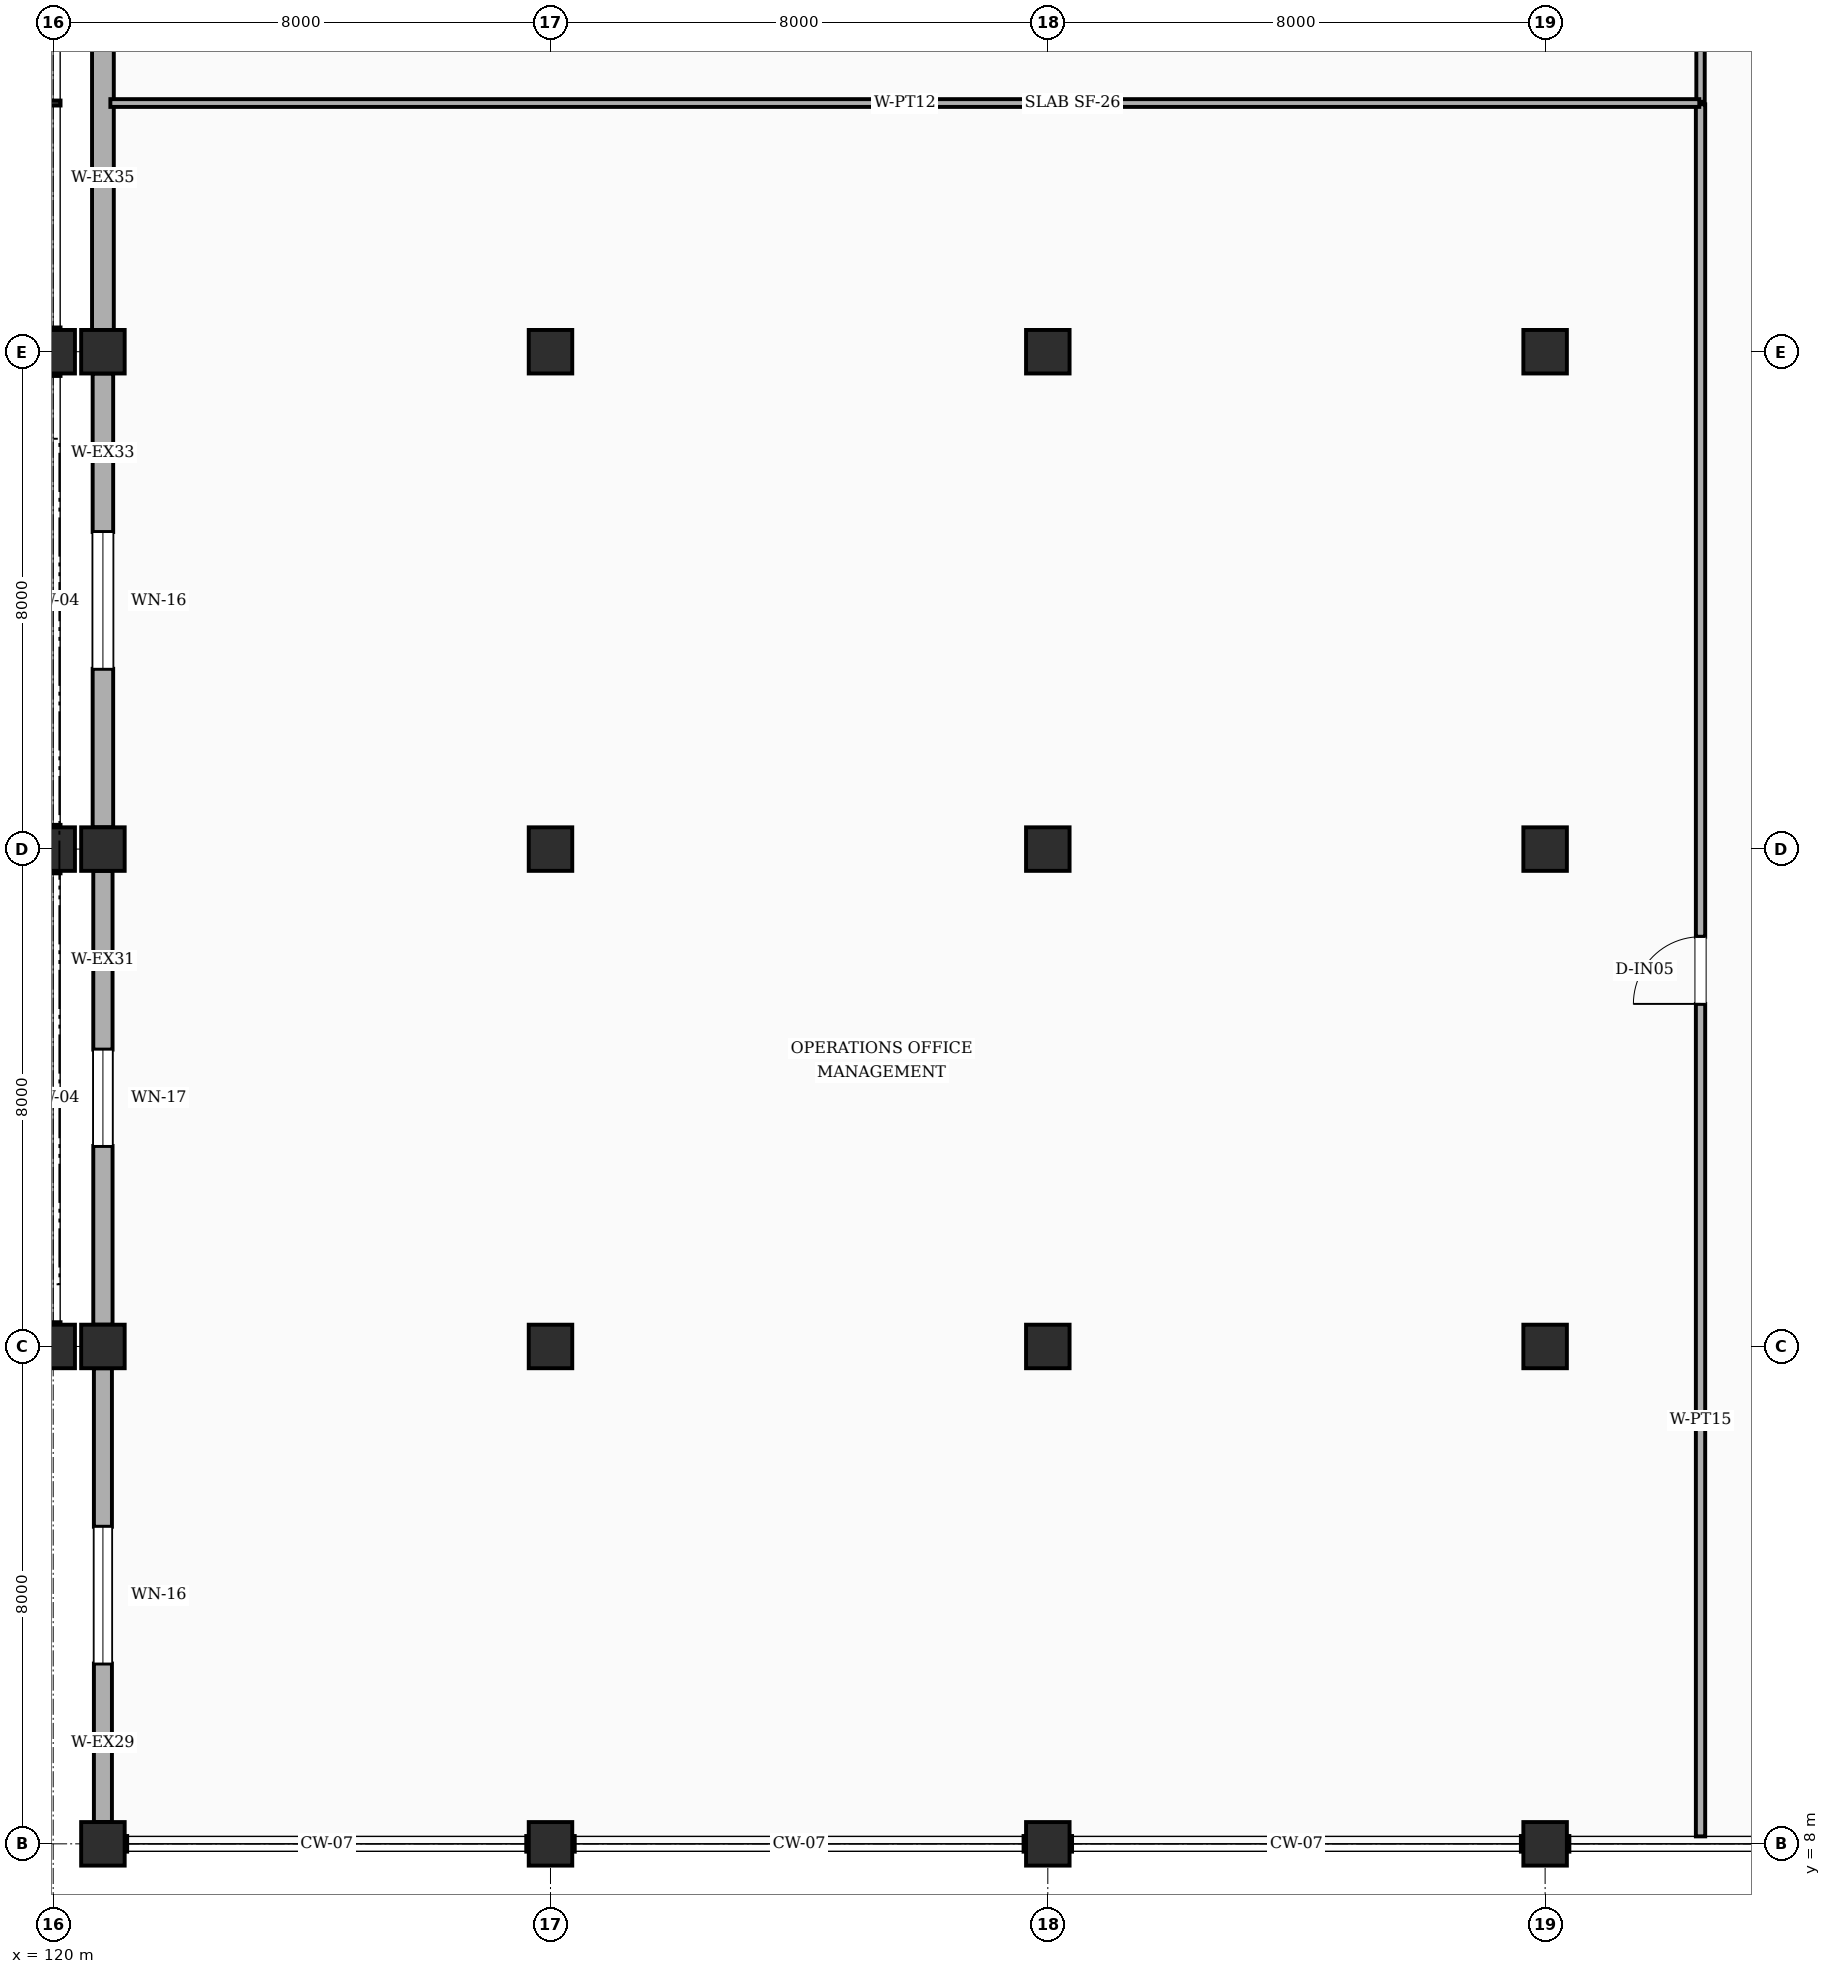
"""IFC4 building model, lengths in metres.
Left out: names, types, materials, properties, quantities, classifications, styles, units other than length and angle.
Written with IfcOpenShell. Run it as: python <this file> out.ifc"""

import sys

from ifc_helpers import new_model, si_unit, direction, frame, frame_2d, origin, origin_2d, place, context, subcontext, project, spatial, rectangle, extrude, element, fill, save


model = new_model("IFC4")
c1 = context("Model", 3, precision=1e-05, world=origin(), true_north=direction((0.0, 1.0)))
c2 = subcontext(c1, "Body", "Model", "MODEL_VIEW")
j1 = project(units=[si_unit("LENGTHUNIT", "METRE"), si_unit("PLANEANGLEUNIT", "RADIAN")], contexts=[c1])
p1 = place(None, origin())
s1 = spatial("IfcSite", under=j1, at=p1, CompositionType="ELEMENT")
p2 = place(p1, origin())
s2 = spatial("IfcBuilding", under=s1, at=p2, CompositionType="ELEMENT")
p3 = place(p2, frame((0.0, 0.0, 10.8)))
s3 = spatial("IfcBuildingStorey", under=s2, at=p3, CompositionType="ELEMENT", Elevation=10.8)
for number, where, z_axis, x_axis in (
    (1, (120.0, 16.0, 0.0), (0.0, 0.0, 1.0), (1.0, 0.0, 0.0)),
    (2, (120.0, 24.0, 0.0), (0.0, 0.0, 1.0), (1.0, 0.0, 0.0)),
    (3, (120.0, 32.0, 0.0), (0.0, 0.0, 1.0), (1.0, 0.0, 0.0)),
    (4, (120.8, 8.0, 0.0), (0.0, 0.0, 1.0), (1.0, 0.0, 0.0)),
    (5, (120.8, 16.0, 0.0), (0.0, 0.0, 1.0), (1.0, 0.0, 0.0)),
    (6, (120.8, 24.0, 0.0), (0.0, 0.0, 1.0), (1.0, 0.0, 0.0)),
    (7, (120.8, 32.0, 0.0), (0.0, 0.0, 1.0), (1.0, 0.0, 0.0)),
    (8, (128.0, 8.0, 0.0), (0.0, 0.0, 1.0), (1.0, 0.0, 0.0)),
    (9, (128.0, 16.0, 0.0), (0.0, 0.0, 1.0), (1.0, 0.0, 0.0)),
    (10, (128.0, 24.0, 0.0), (0.0, 0.0, 1.0), (1.0, 0.0, 0.0)),
    (11, (128.0, 32.0, 0.0), (0.0, 0.0, 1.0), (1.0, 0.0, 0.0)),
    (12, (136.0, 8.0, 0.0), (0.0, 0.0, 1.0), (1.0, 0.0, 0.0)),
    (13, (136.0, 16.0, 0.0), (0.0, 0.0, 1.0), (1.0, 0.0, 0.0)),
    (14, (136.0, 24.0, 0.0), (0.0, 0.0, 1.0), (1.0, 0.0, 0.0)),
    (15, (136.0, 32.0, 0.0), (0.0, 0.0, 1.0), (1.0, 0.0, 0.0)),
    (16, (144.0, 8.0, 0.0), (0.0, 0.0, 1.0), (1.0, 0.0, 0.0)),
    (17, (144.0, 16.0, 0.0), (0.0, 0.0, 1.0), (1.0, 0.0, 0.0)),
    (18, (144.0, 24.0, 0.0), (0.0, 0.0, 1.0), (1.0, 0.0, 0.0)),
    (19, (144.0, 32.0, 0.0), (0.0, 0.0, 1.0), (1.0, 0.0, 0.0)),
):
    element("IfcColumn", number, at=place(p3, frame(where, z_axis=z_axis, x_axis=x_axis)), inside=s3, PredefinedType="COLUMN", context=c2, shape_type="SweptSolid", body=[
        extrude(rectangle(XDim=0.7, YDim=0.7, at=origin_2d()), origin(), (0.0, 0.0, 1.0), 4.2),
    ])
p4 = place(p3, frame((120.8, 39.65, 0.0), z_axis=(0.0, 0.0, 1.0), x_axis=(0.0, -1.0, 0.0)))
e20 = element("IfcWall", 20, at=p4, inside=s3, PredefinedType="STANDARD", context=c2, shape_type="SweptSolid", body=[
    extrude(rectangle(XDim=7.3, YDim=0.35, at=frame_2d((3.65, 0.0))), origin(), (0.0, 0.0, 1.0), 3.365),
])
p5 = place(p4, frame((0.85, 0.0, 0.95)))
e21 = element("IfcOpeningElement", 21, at=p5, cuts=e20, PredefinedType="OPENING", context=c2, shape_type="SweptSolid", body=[
    extrude(rectangle(XDim=1.55, YDim=1.75, at=frame_2d((0.775, 0.875))), frame((0.0, 0.185, 0.0), z_axis=(0.0, -1.0, 0.0), x_axis=(1.0, 0.0, 0.0)), (0.0, 0.0, 1.0), 0.37),
])
p6 = place(p3, frame((120.8, 31.65, 0.0), z_axis=(0.0, 0.0, 1.0), x_axis=(0.0, -1.0, 0.0)))
e22 = element("IfcWall", 22, at=p6, inside=s3, PredefinedType="STANDARD", context=c2, shape_type="SweptSolid", body=[
    extrude(rectangle(XDim=7.3, YDim=0.33, at=frame_2d((3.65, 0.0))), origin(), (0.0, 0.0, 1.0), 3.365),
])
p7 = place(p6, frame((2.55, 0.0, 0.95)))
e23 = element("IfcOpeningElement", 23, at=p7, cuts=e22, PredefinedType="OPENING", context=c2, shape_type="SweptSolid", body=[
    extrude(rectangle(XDim=2.2, YDim=1.75, at=frame_2d((1.1, 0.875))), frame((0.0, 0.175, 0.0), z_axis=(0.0, -1.0, 0.0), x_axis=(1.0, 0.0, 0.0)), (0.0, 0.0, 1.0), 0.35),
])
p8 = place(p3, frame((120.8, 23.65, 0.0), z_axis=(0.0, 0.0, 1.0), x_axis=(0.0, -1.0, 0.0)))
e24 = element("IfcWall", 24, at=p8, inside=s3, PredefinedType="STANDARD", context=c2, shape_type="SweptSolid", body=[
    extrude(rectangle(XDim=7.3, YDim=0.31, at=frame_2d((3.65, 0.0))), origin(), (0.0, 0.0, 1.0), 3.365),
])
p9 = place(p8, frame((2.875, 0.0, 0.95)))
e25 = element("IfcOpeningElement", 25, at=p9, cuts=e24, PredefinedType="OPENING", context=c2, shape_type="SweptSolid", body=[
    extrude(rectangle(XDim=1.55, YDim=1.75, at=frame_2d((0.775, 0.875))), frame((0.0, 0.165, 0.0), z_axis=(0.0, -1.0, 0.0), x_axis=(1.0, 0.0, 0.0)), (0.0, 0.0, 1.0), 0.33),
])
p10 = place(p3, frame((120.8, 15.65, 0.0), z_axis=(0.0, 0.0, 1.0), x_axis=(0.0, -1.0, 0.0)))
e26 = element("IfcWall", 26, at=p10, inside=s3, PredefinedType="STANDARD", context=c2, shape_type="SweptSolid", body=[
    extrude(rectangle(XDim=7.3, YDim=0.29, at=frame_2d((3.65, 0.0))), origin(), (0.0, 0.0, 1.0), 3.36),
])
p11 = place(p10, frame((2.55, 0.0, 0.95)))
e27 = element("IfcOpeningElement", 27, at=p11, cuts=e26, PredefinedType="OPENING", context=c2, shape_type="SweptSolid", body=[
    extrude(rectangle(XDim=2.2, YDim=1.75, at=frame_2d((1.1, 0.875))), frame((0.0, 0.155, 0.0), z_axis=(0.0, -1.0, 0.0), x_axis=(1.0, 0.0, 0.0)), (0.0, 0.0, 1.0), 0.31),
])
p12 = place(p3, frame((146.5, 8.12, 0.0), z_axis=(0.0, 0.0, 1.0), x_axis=(0.0, 1.0, 0.0)))
e28 = element("IfcWall", 28, at=p12, inside=s3, PredefinedType="PARTITIONING", context=c2, shape_type="SweptSolid", body=[
    extrude(rectangle(XDim=27.86, YDim=0.15, at=frame_2d((13.93, 0.0))), origin(), (0.0, 0.0, 1.0), 3.88),
])
p13 = place(p12, frame((13.39, 0.0, 0.0)))
e29 = element("IfcOpeningElement", 29, at=p13, cuts=e28, PredefinedType="OPENING", context=c2, shape_type="SweptSolid", body=[
    extrude(rectangle(XDim=1.08, YDim=2.15, at=frame_2d((0.54, 1.075))), frame((0.0, 0.085, 0.0), z_axis=(0.0, -1.0, 0.0), x_axis=(1.0, 0.0, 0.0)), (0.0, 0.0, 1.0), 0.17),
])
p14 = place(p3, frame((146.5, 36.02, 0.0), z_axis=(0.0, 0.0, 1.0), x_axis=(0.0, 1.0, 0.0)))
e30 = element("IfcWall", 30, at=p14, inside=s3, PredefinedType="PARTITIONING", context=c2, shape_type="SweptSolid", body=[
    extrude(rectangle(XDim=27.86, YDim=0.135, at=frame_2d((13.93, 0.0))), origin(), (0.0, 0.0, 1.0), 3.88),
])
p15 = place(p14, frame((13.39, 0.0, 0.0)))
e31 = element("IfcOpeningElement", 31, at=p15, cuts=e30, PredefinedType="OPENING", context=c2, shape_type="SweptSolid", body=[
    extrude(rectangle(XDim=1.08, YDim=2.15, at=frame_2d((0.54, 1.075))), frame((0.0, 0.077, 0.0), z_axis=(0.0, -1.0, 0.0), x_axis=(1.0, 0.0, 0.0)), (0.0, 0.0, 1.0), 0.155),
])
p16 = place(p3, frame((120.92, 36.0, 0.0), z_axis=(0.0, 0.0, 1.0), x_axis=(1.0, 0.0, 0.0)))
e32 = element("IfcWall", 32, at=p16, inside=s3, PredefinedType="PARTITIONING", context=c2, shape_type="SweptSolid", body=[
    extrude(rectangle(XDim=25.56, YDim=0.125, at=frame_2d((12.78, 0.0))), origin(), (0.0, 0.0, 1.0), 3.25),
])
p17 = place(p7, origin())
e33 = element("IfcWindow", 33, at=p17, inside=s3, PartitioningType="SINGLE_PANEL", PredefinedType="WINDOW", context=c2, shape_type="SweptSolid", body=[
    extrude(rectangle(XDim=2.2, YDim=1.75, at=frame_2d((1.1, 0.875))), frame((0.0, 0.03, 0.0), z_axis=(0.0, -1.0, 0.0), x_axis=(1.0, 0.0, 0.0)), (0.0, 0.0, 1.0), 0.06),
])
fill(e23, e33)
p18 = place(p9, origin())
e34 = element("IfcWindow", 34, at=p18, inside=s3, PartitioningType="SINGLE_PANEL", PredefinedType="WINDOW", context=c2, shape_type="SweptSolid", body=[
    extrude(rectangle(XDim=1.55, YDim=1.75, at=frame_2d((0.775, 0.875))), frame((0.0, 0.03, 0.0), z_axis=(0.0, -1.0, 0.0), x_axis=(1.0, 0.0, 0.0)), (0.0, 0.0, 1.0), 0.06),
])
fill(e25, e34)
p19 = place(p11, origin())
e35 = element("IfcWindow", 35, at=p19, inside=s3, PartitioningType="SINGLE_PANEL", PredefinedType="WINDOW", context=c2, shape_type="SweptSolid", body=[
    extrude(rectangle(XDim=2.2, YDim=1.75, at=frame_2d((1.1, 0.875))), frame((0.0, 0.03, 0.0), z_axis=(0.0, -1.0, 0.0), x_axis=(1.0, 0.0, 0.0)), (0.0, 0.0, 1.0), 0.06),
])
fill(e27, e35)
p20 = place(p13, origin())
e36 = element("IfcDoor", 36, at=p20, inside=s3, OperationType="SINGLE_SWING_LEFT", PredefinedType="DOOR", context=c2, shape_type="SweptSolid", body=[
    extrude(rectangle(XDim=1.08, YDim=2.15, at=frame_2d((0.54, 1.075))), frame((0.0, 0.025, 0.0), z_axis=(0.0, -1.0, 0.0), x_axis=(1.0, 0.0, 0.0)), (0.0, 0.0, 1.0), 0.05),
])
fill(e29, e36)
save(model, sys.argv[1])
